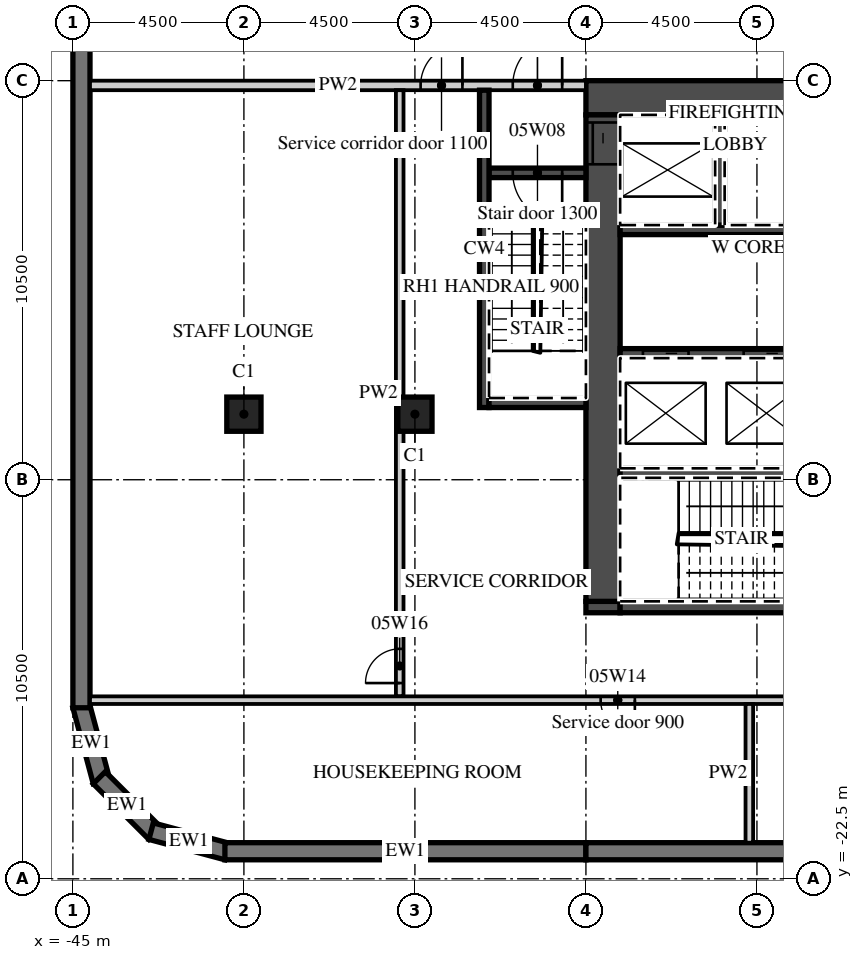
"""IFC4 building model, lengths in metres.
Left out: names, types, materials, properties, quantities, classifications, styles, units other than length and angle.
Written with IfcOpenShell. Run it as: python <this file> out.ifc"""

import sys

from ifc_helpers import new_model, si_unit, direction, frame, frame_2d, origin, origin_2d, place, context, subcontext, project, spatial, polyline, rectangle, outline, extrude, element, fill, save


model = new_model("IFC4")
c1 = context("Model", 3, precision=1e-05, world=origin(), true_north=direction((0.0, 1.0)))
c2 = subcontext(c1, "Body", "Model", "MODEL_VIEW")
j1 = project(units=[si_unit("LENGTHUNIT", "METRE"), si_unit("PLANEANGLEUNIT", "RADIAN")], contexts=[c1])
p1 = place(None, origin())
s1 = spatial("IfcSite", under=j1, at=p1, CompositionType="ELEMENT")
p2 = place(p1, origin())
s2 = spatial("IfcBuilding", under=s1, at=p2, CompositionType="ELEMENT")
p3 = place(p2, frame((0.0, 0.0, 33.5)))
s3 = spatial("IfcBuildingStorey", under=s2, at=p3, CompositionType="ELEMENT", Elevation=33.5)
for number, where, z_axis, x_axis in (
    (1, (-40.5, -10.275, 0.0), (0.0, 0.0, 1.0), (1.0, 0.0, 0.0)),
    (2, (-36.0, -10.275, 0.0), (0.0, 0.0, 1.0), (1.0, 0.0, 0.0)),
):
    element("IfcColumn", number, at=place(p3, frame(where, z_axis=z_axis, x_axis=x_axis)), inside=s3, PredefinedType="COLUMN", context=c2, shape_type="SweptSolid", body=[
        extrude(rectangle(XDim=0.9, YDim=0.9, at=origin_2d()), origin(), (0.0, 0.0, 1.0), 4.5),
    ])
p4 = place(p3, frame((-44.783, -17.942, 0.0), z_axis=(0.0, 0.0, 1.0), x_axis=(0.25881466832, -0.965926999034, 0.0)))
e3 = element("IfcWall", 3, at=p4, inside=s3, PredefinedType="SOLIDWALL", context=c2, shape_type="SweptSolid", body=[
    extrude(outline(polyline([(0.0, -0.225), (2.071, -0.225), (1.95, 0.225), (0.121, 0.225), (0.0, -0.225)])), origin(), (0.0, 0.0, 1.0), 4.05),
])
p5 = place(p3, frame((-44.305, -19.841, 0.0), z_axis=(0.0, 0.0, 1.0), x_axis=(0.707106781187, -0.707106781187, 0.0)))
e4 = element("IfcWall", 4, at=p5, inside=s3, PredefinedType="SOLIDWALL", context=c2, shape_type="SweptSolid", body=[
    extrude(outline(polyline([(0.0, -0.225), (2.071, -0.225), (1.95, 0.225), (0.121, 0.225), (0.0, -0.225)])), origin(), (0.0, 0.0, 1.0), 4.05),
])
p6 = place(p3, frame((-42.942, -21.247, 0.0), z_axis=(0.0, 0.0, 1.0), x_axis=(0.965926999034, -0.25881466832, 0.0)))
e5 = element("IfcWall", 5, at=p6, inside=s3, PredefinedType="SOLIDWALL", context=c2, shape_type="SweptSolid", body=[
    extrude(outline(polyline([(-0.0, -0.225), (2.07, -0.225), (1.95, 0.225), (0.12, 0.225), (-0.0, -0.225)])), origin(), (0.0, 0.0, 1.0), 4.05),
])
p7 = place(p3, frame((-41.0, -21.775, 0.0), z_axis=(0.0, 0.0, 1.0), x_axis=(1.0, 0.0, 0.0)))
e6 = element("IfcWall", 6, at=p7, inside=s3, PredefinedType="SOLIDWALL", context=c2, shape_type="SweptSolid", body=[
    extrude(rectangle(XDim=9.5, YDim=0.45, at=frame_2d((4.75, 0.0))), origin(), (0.0, 0.0, 1.0), 4.05),
])
p8 = place(p3, frame((-31.5, -21.775, 0.0), z_axis=(0.0, 0.0, 1.0), x_axis=(1.0, 0.0, 0.0)))
e7 = element("IfcWall", 7, at=p8, inside=s3, PredefinedType="SOLIDWALL", context=c2, shape_type="SweptSolid", body=[
    extrude(rectangle(XDim=18.0, YDim=0.45, at=frame_2d((9.0, 0.0))), origin(), (0.0, 0.0, 1.0), 4.05),
])
p9 = place(p3, frame((-44.775, 18.0, 0.0), z_axis=(0.0, 0.0, 1.0), x_axis=(0.0, -1.0, 0.0)))
e8 = element("IfcWall", 8, at=p9, inside=s3, PredefinedType="SOLIDWALL", context=c2, shape_type="SweptSolid", body=[
    extrude(rectangle(XDim=36.0, YDim=0.45, at=frame_2d((18.0, 0.0))), origin(), (0.0, 0.0, 1.0), 4.05),
])
p10 = place(p9, frame((4.05, 0.0, 0.9)))
e9 = element("IfcOpeningElement", 9, at=p10, cuts=e8, PredefinedType="OPENING", context=c2, shape_type="SweptSolid", body=[
    extrude(rectangle(XDim=3.0, YDim=1.8, at=frame_2d((1.5, 0.9))), frame((0.0, 0.235, 0.0), z_axis=(0.0, -1.0, 0.0), x_axis=(1.0, 0.0, 0.0)), (0.0, 0.0, 1.0), 0.47),
])
p11 = place(p3, frame((-31.5, -1.95, 0.0), z_axis=(0.0, 0.0, 1.0), x_axis=(1.0, 0.0, 0.0)))
e10 = element("IfcWall", 10, at=p11, inside=s3, PredefinedType="SHEAR", context=c2, shape_type="SweptSolid", body=[
    extrude(rectangle(XDim=18.0, YDim=0.9, at=frame_2d((9.0, 0.0))), origin(), (0.0, 0.0, 1.0), 4.05),
])
p12 = place(p11, frame((14.725, 0.0, 0.0)))
e11 = element("IfcOpeningElement", 11, at=p12, cuts=e10, PredefinedType="OPENING", context=c2, shape_type="SweptSolid", body=[
    extrude(rectangle(XDim=1.8, YDim=2.1, at=frame_2d((0.9, 1.05))), frame((0.0, 0.46, 0.0), z_axis=(0.0, -1.0, 0.0), x_axis=(1.0, 0.0, 0.0)), (0.0, 0.0, 1.0), 0.92),
])
p13 = place(p3, frame((-31.5, -15.35, 0.0), z_axis=(0.0, 0.0, 1.0), x_axis=(1.0, 0.0, 0.0)))
e12 = element("IfcWall", 12, at=p13, inside=s3, PredefinedType="SHEAR", context=c2, shape_type="SweptSolid", body=[
    extrude(rectangle(XDim=0.9, YDim=0.3, at=frame_2d((0.45, 0.0))), origin(), (0.0, 0.0, 1.0), 4.05),
])
p14 = place(p3, frame((-30.6, -15.35, 0.0), z_axis=(0.0, 0.0, 1.0), x_axis=(1.0, 0.0, 0.0)))
e13 = element("IfcWall", 13, at=p14, inside=s3, PredefinedType="SHEAR", context=c2, shape_type="SweptSolid", body=[
    extrude(rectangle(XDim=10.3, YDim=0.3, at=frame_2d((5.15, 0.0))), origin(), (0.0, 0.0, 1.0), 4.05),
])
p15 = place(p14, frame((5.0, 0.0, 0.0)))
e14 = element("IfcOpeningElement", 14, at=p15, cuts=e13, PredefinedType="OPENING", context=c2, shape_type="SweptSolid", body=[
    extrude(rectangle(XDim=1.3, YDim=2.1, at=frame_2d((0.65, 1.05))), frame((0.0, 0.16, 0.0), z_axis=(0.0, -1.0, 0.0), x_axis=(1.0, 0.0, 0.0)), (0.0, 0.0, 1.0), 0.32),
])
p16 = place(p14, frame((7.113, 0.0, 0.0)))
e15 = element("IfcOpeningElement", 15, at=p16, cuts=e13, PredefinedType="OPENING", context=c2, shape_type="SweptSolid", body=[
    extrude(rectangle(XDim=0.9, YDim=2.1, at=frame_2d((0.45, 1.05))), frame((0.0, 0.16, 0.0), z_axis=(0.0, -1.0, 0.0), x_axis=(1.0, 0.0, 0.0)), (0.0, 0.0, 1.0), 0.32),
])
p17 = place(p14, frame((8.938, 0.0, 0.0)))
e16 = element("IfcOpeningElement", 16, at=p17, cuts=e13, PredefinedType="OPENING", context=c2, shape_type="SweptSolid", body=[
    extrude(rectangle(XDim=0.9, YDim=2.1, at=frame_2d((0.45, 1.05))), frame((0.0, 0.16, 0.0), z_axis=(0.0, -1.0, 0.0), x_axis=(1.0, 0.0, 0.0)), (0.0, 0.0, 1.0), 0.32),
])
p18 = place(p3, frame((-31.05, -15.2, 0.0), z_axis=(0.0, 0.0, 1.0), x_axis=(0.0, 1.0, 0.0)))
e17 = element("IfcWall", 17, at=p18, inside=s3, PredefinedType="SHEAR", context=c2, shape_type="SweptSolid", body=[
    extrude(rectangle(XDim=12.8, YDim=0.9, at=frame_2d((6.4, 0.0))), origin(), (0.0, 0.0, 1.0), 4.05),
])
p19 = place(p18, frame((11.5, 0.0, 0.0)))
e18 = element("IfcOpeningElement", 18, at=p19, cuts=e17, PredefinedType="OPENING", context=c2, shape_type="SweptSolid", body=[
    extrude(rectangle(XDim=1.1, YDim=2.1, at=frame_2d((0.55, 1.05))), frame((0.0, 0.46, 0.0), z_axis=(0.0, -1.0, 0.0), x_axis=(1.0, 0.0, 0.0)), (0.0, 0.0, 1.0), 0.92),
])
p20 = place(p3, frame((-30.6, -5.425, 0.0), z_axis=(0.0, 0.0, 1.0), x_axis=(1.0, 0.0, 0.0)))
e19 = element("IfcWall", 19, at=p20, inside=s3, PredefinedType="SHEAR", context=c2, shape_type="SweptSolid", body=[
    extrude(rectangle(XDim=13.0, YDim=0.25, at=frame_2d((6.5, 0.0))), origin(), (0.0, 0.0, 1.0), 4.05),
])
p21 = place(p3, frame((-27.975, -5.3, 0.0), z_axis=(0.0, 0.0, 1.0), x_axis=(0.0, 1.0, 0.0)))
e20 = element("IfcWall", 20, at=p21, inside=s3, PredefinedType="SHEAR", context=c2, shape_type="SweptSolid", body=[
    extrude(rectangle(XDim=2.9, YDim=0.25, at=frame_2d((1.45, 0.0))), origin(), (0.0, 0.0, 1.0), 4.05),
])
p22 = place(p3, frame((-30.6, -8.675, 0.0), z_axis=(0.0, 0.0, 1.0), x_axis=(1.0, 0.0, 0.0)))
e21 = element("IfcWall", 21, at=p22, inside=s3, PredefinedType="SHEAR", context=c2, shape_type="SweptSolid", body=[
    extrude(rectangle(XDim=16.2, YDim=0.25, at=frame_2d((8.1, 0.0))), origin(), (0.0, 0.0, 1.0), 4.05),
])
p23 = place(p22, frame((0.6, 0.0, 0.0)))
e22 = element("IfcOpeningElement", 22, at=p23, cuts=e21, PredefinedType="OPENING", context=c2, shape_type="SweptSolid", body=[
    extrude(rectangle(XDim=1.2, YDim=2.1, at=frame_2d((0.6, 1.05))), frame((0.0, 0.135, 0.0), z_axis=(0.0, -1.0, 0.0), x_axis=(1.0, 0.0, 0.0)), (0.0, 0.0, 1.0), 0.27),
])
p24 = place(p22, frame((3.25, 0.0, 0.0)))
e23 = element("IfcOpeningElement", 23, at=p24, cuts=e21, PredefinedType="OPENING", context=c2, shape_type="SweptSolid", body=[
    extrude(rectangle(XDim=1.2, YDim=2.1, at=frame_2d((0.6, 1.05))), frame((0.0, 0.135, 0.0), z_axis=(0.0, -1.0, 0.0), x_axis=(1.0, 0.0, 0.0)), (0.0, 0.0, 1.0), 0.27),
])
p25 = place(p22, frame((5.9, 0.0, 0.0)))
e24 = element("IfcOpeningElement", 24, at=p25, cuts=e21, PredefinedType="OPENING", context=c2, shape_type="SweptSolid", body=[
    extrude(rectangle(XDim=1.2, YDim=2.1, at=frame_2d((0.6, 1.05))), frame((0.0, 0.135, 0.0), z_axis=(0.0, -1.0, 0.0), x_axis=(1.0, 0.0, 0.0)), (0.0, 0.0, 1.0), 0.27),
])
p26 = place(p22, frame((14.25, 0.0, 0.0)))
e25 = element("IfcOpeningElement", 25, at=p26, cuts=e21, PredefinedType="OPENING", context=c2, shape_type="SweptSolid", body=[
    extrude(rectangle(XDim=1.3, YDim=2.1, at=frame_2d((0.65, 1.05))), frame((0.0, 0.135, 0.0), z_axis=(0.0, -1.0, 0.0), x_axis=(1.0, 0.0, 0.0)), (0.0, 0.0, 1.0), 0.27),
])
p27 = place(p3, frame((-30.6, -11.825, 0.0), z_axis=(0.0, 0.0, 1.0), x_axis=(1.0, 0.0, 0.0)))
e26 = element("IfcWall", 26, at=p27, inside=s3, PredefinedType="SHEAR", context=c2, shape_type="SweptSolid", body=[
    extrude(rectangle(XDim=13.25, YDim=0.25, at=frame_2d((6.625, 0.0))), origin(), (0.0, 0.0, 1.0), 4.05),
])
p28 = place(p3, frame((-44.55, -1.625, 0.0), z_axis=(0.0, 0.0, 1.0), x_axis=(1.0, 0.0, 0.0)))
e27 = element("IfcWall", 27, at=p28, inside=s3, PredefinedType="PARTITIONING", context=c2, shape_type="SweptSolid", body=[
    extrude(rectangle(XDim=13.05, YDim=0.25, at=frame_2d((6.525, 0.0))), origin(), (0.0, 0.0, 1.0), 4.05),
])
p29 = place(p28, frame((11.125, 0.0, 0.0)))
e28 = element("IfcOpeningElement", 28, at=p29, cuts=e27, PredefinedType="OPENING", context=c2, shape_type="SweptSolid", body=[
    extrude(rectangle(XDim=1.3, YDim=2.1, at=frame_2d((0.65, 1.05))), frame((0.0, 0.135, 0.0), z_axis=(0.0, -1.0, 0.0), x_axis=(1.0, 0.0, 0.0)), (0.0, 0.0, 1.0), 0.27),
])
p30 = place(p28, frame((8.7, 0.0, 0.0)))
e29 = element("IfcOpeningElement", 29, at=p30, cuts=e27, PredefinedType="OPENING", context=c2, shape_type="SweptSolid", body=[
    extrude(rectangle(XDim=1.1, YDim=2.1, at=frame_2d((0.55, 1.05))), frame((0.0, 0.135, 0.0), z_axis=(0.0, -1.0, 0.0), x_axis=(1.0, 0.0, 0.0)), (0.0, 0.0, 1.0), 0.27),
])
p31 = place(p3, frame((-34.05, -3.925, 0.0), z_axis=(0.0, 0.0, 1.0), x_axis=(1.0, 0.0, 0.0)))
e30 = element("IfcWall", 30, at=p31, inside=s3, PredefinedType="SHEAR", context=c2, shape_type="SweptSolid", body=[
    extrude(rectangle(XDim=2.55, YDim=0.25, at=frame_2d((1.275, 0.0))), origin(), (0.0, 0.0, 1.0), 4.05),
])
p32 = place(p31, frame((0.625, 0.0, 0.0)))
e31 = element("IfcOpeningElement", 31, at=p32, cuts=e30, PredefinedType="OPENING", context=c2, shape_type="SweptSolid", body=[
    extrude(rectangle(XDim=1.3, YDim=2.1, at=frame_2d((0.65, 1.05))), frame((0.0, 0.135, 0.0), z_axis=(0.0, -1.0, 0.0), x_axis=(1.0, 0.0, 0.0)), (0.0, 0.0, 1.0), 0.27),
])
p33 = place(p3, frame((-34.175, -10.1, 0.0), z_axis=(0.0, 0.0, 1.0), x_axis=(0.0, 1.0, 0.0)))
e32 = element("IfcWall", 32, at=p33, inside=s3, PredefinedType="SHEAR", context=c2, shape_type="SweptSolid", body=[
    extrude(rectangle(XDim=8.35, YDim=0.25, at=frame_2d((4.175, 0.0))), origin(), (0.0, 0.0, 1.0), 4.05),
])
p34 = place(p3, frame((-34.05, -9.975, 0.0), z_axis=(0.0, 0.0, 1.0), x_axis=(1.0, 0.0, 0.0)))
e33 = element("IfcWall", 33, at=p34, inside=s3, PredefinedType="SHEAR", context=c2, shape_type="SweptSolid", body=[
    extrude(rectangle(XDim=2.55, YDim=0.25, at=frame_2d((1.275, 0.0))), origin(), (0.0, 0.0, 1.0), 4.05),
])
p35 = place(p3, frame((-36.4, -17.7, 0.0), z_axis=(0.0, 0.0, 1.0), x_axis=(0.0, 1.0, 0.0)))
e34 = element("IfcWall", 34, at=p35, inside=s3, PredefinedType="PARTITIONING", context=c2, shape_type="SweptSolid", body=[
    extrude(rectangle(XDim=15.95, YDim=0.2, at=frame_2d((7.975, 0.0))), origin(), (0.0, 0.0, 1.0), 4.05),
])
p36 = place(p35, frame((0.35, 0.0, 0.0)))
e35 = element("IfcOpeningElement", 35, at=p36, cuts=e34, PredefinedType="OPENING", context=c2, shape_type="SweptSolid", body=[
    extrude(rectangle(XDim=0.9, YDim=2.1, at=frame_2d((0.45, 1.05))), frame((0.0, 0.11, 0.0), z_axis=(0.0, -1.0, 0.0), x_axis=(1.0, 0.0, 0.0)), (0.0, 0.0, 1.0), 0.22),
])
p37 = place(p3, frame((-44.55, -17.8, 0.0), z_axis=(0.0, 0.0, 1.0), x_axis=(1.0, 0.0, 0.0)))
e36 = element("IfcWall", 36, at=p37, inside=s3, PredefinedType="PARTITIONING", context=c2, shape_type="SweptSolid", body=[
    extrude(rectangle(XDim=30.95, YDim=0.2, at=frame_2d((15.475, 0.0))), origin(), (0.0, 0.0, 1.0), 4.05),
])
p38 = place(p37, frame((13.438, 0.0, 0.0)))
e37 = element("IfcOpeningElement", 37, at=p38, cuts=e36, PredefinedType="OPENING", context=c2, shape_type="SweptSolid", body=[
    extrude(rectangle(XDim=0.9, YDim=2.1, at=frame_2d((0.45, 1.05))), frame((0.0, 0.11, 0.0), z_axis=(0.0, -1.0, 0.0), x_axis=(1.0, 0.0, 0.0)), (0.0, 0.0, 1.0), 0.22),
])
p39 = place(p37, frame((21.738, 0.0, 0.0)))
e38 = element("IfcOpeningElement", 38, at=p39, cuts=e36, PredefinedType="OPENING", context=c2, shape_type="SweptSolid", body=[
    extrude(rectangle(XDim=0.9, YDim=2.1, at=frame_2d((0.45, 1.05))), frame((0.0, 0.11, 0.0), z_axis=(0.0, -1.0, 0.0), x_axis=(1.0, 0.0, 0.0)), (0.0, 0.0, 1.0), 0.22),
])
p40 = place(p3, frame((-27.2, -21.55, 0.0), z_axis=(0.0, 0.0, 1.0), x_axis=(0.0, 1.0, 0.0)))
e39 = element("IfcWall", 39, at=p40, inside=s3, PredefinedType="PARTITIONING", context=c2, shape_type="SweptSolid", body=[
    extrude(rectangle(XDim=3.65, YDim=0.2, at=frame_2d((1.825, 0.0))), origin(), (0.0, 0.0, 1.0), 4.05),
])
p41 = place(p23, origin())
e40 = element("IfcDoor", 40, at=p41, inside=s3, OperationType="SLIDING_TO_LEFT", PredefinedType="DOOR", context=c2, shape_type="SweptSolid", body=[
    extrude(rectangle(XDim=1.2, YDim=2.1, at=frame_2d((0.6, 1.05))), frame((0.0, 0.025, 0.0), z_axis=(0.0, -1.0, 0.0), x_axis=(1.0, 0.0, 0.0)), (0.0, 0.0, 1.0), 0.05),
])
fill(e22, e40)
p42 = place(p24, origin())
e41 = element("IfcDoor", 41, at=p42, inside=s3, OperationType="SLIDING_TO_RIGHT", PredefinedType="DOOR", context=c2, shape_type="SweptSolid", body=[
    extrude(rectangle(XDim=1.2, YDim=2.1, at=frame_2d((0.6, 1.05))), frame((0.0, 0.025, 0.0), z_axis=(0.0, -1.0, 0.0), x_axis=(1.0, 0.0, 0.0)), (0.0, 0.0, 1.0), 0.05),
])
fill(e23, e41)
p43 = place(p19, origin())
e42 = element("IfcDoor", 42, at=p43, inside=s3, OperationType="SLIDING_TO_RIGHT", PredefinedType="DOOR", context=c2, shape_type="SweptSolid", body=[
    extrude(rectangle(XDim=1.1, YDim=2.1, at=frame_2d((0.55, 1.05))), frame((0.0, 0.025, 0.0), z_axis=(0.0, -1.0, 0.0), x_axis=(1.0, 0.0, 0.0)), (0.0, 0.0, 1.0), 0.05),
])
fill(e18, e42)
p44 = place(p29, origin())
e43 = element("IfcDoor", 43, at=p44, inside=s3, OperationType="SINGLE_SWING_RIGHT", PredefinedType="DOOR", context=c2, shape_type="SweptSolid", body=[
    extrude(rectangle(XDim=1.3, YDim=2.1, at=frame_2d((0.65, 1.05))), frame((0.0, 0.025, 0.0), z_axis=(0.0, -1.0, 0.0), x_axis=(1.0, 0.0, 0.0)), (0.0, 0.0, 1.0), 0.05),
])
fill(e28, e43)
p45 = place(p32, origin())
e44 = element("IfcDoor", 44, at=p45, inside=s3, OperationType="SINGLE_SWING_RIGHT", PredefinedType="DOOR", context=c2, shape_type="SweptSolid", body=[
    extrude(rectangle(XDim=1.3, YDim=2.1, at=frame_2d((0.65, 1.05))), frame((0.0, 0.025, 0.0), z_axis=(0.0, -1.0, 0.0), x_axis=(1.0, 0.0, 0.0)), (0.0, 0.0, 1.0), 0.05),
])
fill(e31, e44)
p46 = place(p30, origin())
e45 = element("IfcDoor", 45, at=p46, inside=s3, OperationType="SINGLE_SWING_RIGHT", PredefinedType="DOOR", context=c2, shape_type="SweptSolid", body=[
    extrude(rectangle(XDim=1.1, YDim=2.1, at=frame_2d((0.55, 1.05))), frame((0.0, 0.025, 0.0), z_axis=(0.0, -1.0, 0.0), x_axis=(1.0, 0.0, 0.0)), (0.0, 0.0, 1.0), 0.05),
])
fill(e29, e45)
p47 = place(p38, origin())
e46 = element("IfcDoor", 46, at=p47, inside=s3, OperationType="SINGLE_SWING_RIGHT", PredefinedType="DOOR", context=c2, shape_type="SweptSolid", body=[
    extrude(rectangle(XDim=0.9, YDim=2.1, at=frame_2d((0.45, 1.05))), frame((0.0, 0.025, 0.0), z_axis=(0.0, -1.0, 0.0), x_axis=(1.0, 0.0, 0.0)), (0.0, 0.0, 1.0), 0.05),
])
fill(e37, e46)
p48 = place(p36, origin())
e47 = element("IfcDoor", 47, at=p48, inside=s3, OperationType="SINGLE_SWING_LEFT", PredefinedType="DOOR", context=c2, shape_type="SweptSolid", body=[
    extrude(rectangle(XDim=0.9, YDim=2.1, at=frame_2d((0.45, 1.05))), frame((0.0, 0.025, 0.0), z_axis=(0.0, -1.0, 0.0), x_axis=(1.0, 0.0, 0.0)), (0.0, 0.0, 1.0), 0.05),
])
fill(e35, e47)
save(model, sys.argv[1])
